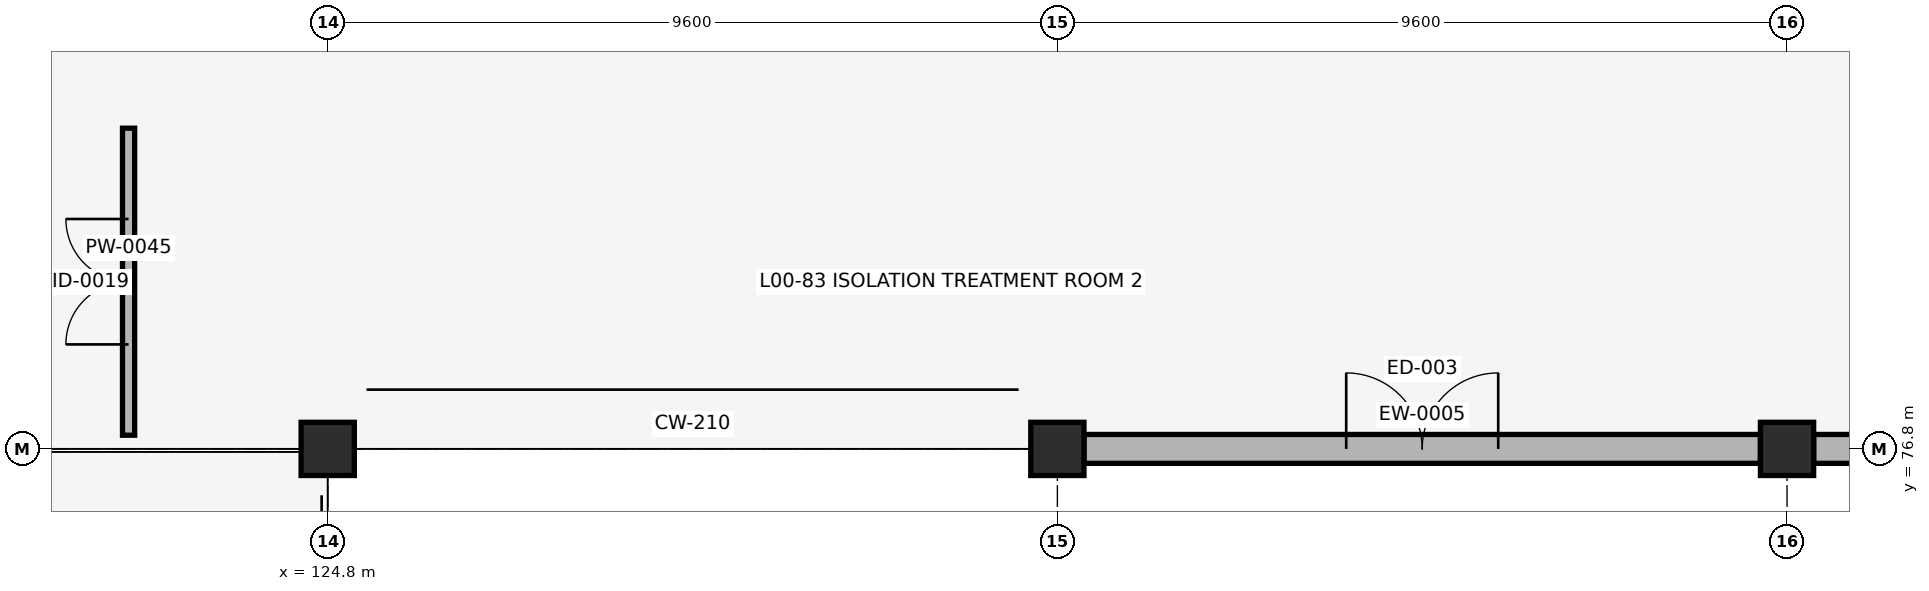
"""IFC4 building model, lengths in metres.
Left out: names, types, materials, properties, quantities, classifications, styles, units other than length and angle.
Written with IfcOpenShell. Run it as: python <this file> out.ifc"""

import sys

from ifc_helpers import new_model, si_unit, direction, frame, frame_2d, origin, origin_2d, place, context, subcontext, project, spatial, rectangle, circle, extrude, element, fill, save


model = new_model("IFC4")
c1 = context("Model", 3, precision=1e-05, world=origin(), true_north=direction((0.0, 1.0)))
c2 = subcontext(c1, "Body", "Model", "MODEL_VIEW")
j1 = project(units=[si_unit("LENGTHUNIT", "METRE"), si_unit("PLANEANGLEUNIT", "RADIAN")], contexts=[c1])
p1 = place(None, origin())
s1 = spatial("IfcSite", under=j1, at=p1, CompositionType="ELEMENT")
p2 = place(p1, origin())
s2 = spatial("IfcBuilding", under=s1, at=p2, CompositionType="ELEMENT")
p3 = place(p2, origin())
s3 = spatial("IfcBuildingStorey", under=s2, at=p3, CompositionType="ELEMENT", Elevation=0.0)
for number, where, z_axis, x_axis in (
    (1, (124.8, 76.8, -0.44), (0.0, 0.0, 1.0), (1.0, 0.0, 0.0)),
    (2, (134.4, 76.8, -0.44), (0.0, 0.0, 1.0), (1.0, 0.0, 0.0)),
    (3, (144.0, 76.8, -0.44), (0.0, 0.0, 1.0), (1.0, 0.0, 0.0)),
):
    element("IfcColumn", number, at=place(p3, frame(where, z_axis=z_axis, x_axis=x_axis)), inside=s3, PredefinedType="COLUMN", context=c2, shape_type="SweptSolid", body=[
        extrude(circle(Radius=0.35, at=origin_2d()), origin(), (0.0, 0.0, 1.0), 4.86),
    ])
p4 = place(p3, frame((134.75, 76.8, 0.0), z_axis=(0.0, 0.0, 1.0), x_axis=(1.0, 0.0, 0.0)))
e4 = element("IfcWall", 4, at=p4, inside=s3, PredefinedType="SOLIDWALL", context=c2, shape_type="SweptSolid", body=[
    extrude(rectangle(XDim=8.9, YDim=0.38, at=frame_2d((4.45, 0.0))), origin(), (0.0, 0.0, 1.0), 3.37),
])
p5 = place(p4, frame((3.45, 0.0, 0.0)))
e5 = element("IfcOpeningElement", 5, at=p5, cuts=e4, PredefinedType="OPENING", context=c2, shape_type="SweptSolid", body=[
    extrude(rectangle(XDim=2.0, YDim=2.3, at=frame_2d((1.0, 1.15))), frame((0.0, 0.2, 0.0), z_axis=(0.0, -1.0, 0.0), x_axis=(1.0, 0.0, 0.0)), (0.0, 0.0, 1.0), 0.4),
])
p6 = place(p3, frame((144.35, 76.8, 0.0), z_axis=(0.0, 0.0, 1.0), x_axis=(1.0, 0.0, 0.0)))
e6 = element("IfcWall", 6, at=p6, inside=s3, PredefinedType="SOLIDWALL", context=c2, shape_type="SweptSolid", body=[
    extrude(rectangle(XDim=8.9, YDim=0.38, at=frame_2d((4.45, 0.0))), origin(), (0.0, 0.0, 1.0), 3.37),
])
p7 = place(p6, frame((2.317, 0.0, 0.72)))
e7 = element("IfcOpeningElement", 7, at=p7, cuts=e6, PredefinedType="OPENING", context=c2, shape_type="SweptSolid", body=[
    extrude(rectangle(XDim=1.3, YDim=2.32, at=frame_2d((0.65, 1.16))), frame((0.0, 0.2, 0.0), z_axis=(0.0, -1.0, 0.0), x_axis=(1.0, 0.0, 0.0)), (0.0, 0.0, 1.0), 0.4),
])
p8 = place(p6, frame((5.283, 0.0, 0.72)))
e8 = element("IfcOpeningElement", 8, at=p8, cuts=e6, PredefinedType="OPENING", context=c2, shape_type="SweptSolid", body=[
    extrude(rectangle(XDim=1.3, YDim=2.32, at=frame_2d((0.65, 1.16))), frame((0.0, 0.2, 0.0), z_axis=(0.0, -1.0, 0.0), x_axis=(1.0, 0.0, 0.0)), (0.0, 0.0, 1.0), 0.4),
])
p9 = place(p3, frame((122.18, 76.98, 0.0), z_axis=(0.0, 0.0, 1.0), x_axis=(0.0, 1.0, 0.0)))
e9 = element("IfcWall", 9, at=p9, inside=s3, PredefinedType="PARTITIONING", context=c2, shape_type="SweptSolid", body=[
    extrude(rectangle(XDim=4.04, YDim=0.16, at=frame_2d((2.02, 0.0))), origin(), (0.0, 0.0, 1.0), 3.37),
])
p10 = place(p9, frame((1.195, 0.0, 0.0)))
e10 = element("IfcOpeningElement", 10, at=p10, cuts=e9, PredefinedType="OPENING", context=c2, shape_type="SweptSolid", body=[
    extrude(rectangle(XDim=1.65, YDim=2.15, at=frame_2d((0.825, 1.075))), frame((0.0, 0.09, 0.0), z_axis=(0.0, -1.0, 0.0), x_axis=(1.0, 0.0, 0.0)), (0.0, 0.0, 1.0), 0.18),
])
p11 = place(p5, origin())
e11 = element("IfcDoor", 11, at=p11, inside=s3, OperationType="DOUBLE_DOOR_SINGLE_SWING", PredefinedType="DOOR", context=c2, shape_type="SweptSolid", body=[
    extrude(rectangle(XDim=2.0, YDim=2.3, at=frame_2d((1.0, 1.15))), frame((0.0, 0.025, 0.0), z_axis=(0.0, -1.0, 0.0), x_axis=(1.0, 0.0, 0.0)), (0.0, 0.0, 1.0), 0.05),
])
fill(e5, e11)
p12 = place(p10, origin())
e12 = element("IfcDoor", 12, at=p12, inside=s3, OperationType="DOUBLE_DOOR_SINGLE_SWING", PredefinedType="DOOR", context=c2, shape_type="SweptSolid", body=[
    extrude(rectangle(XDim=1.65, YDim=2.15, at=frame_2d((0.825, 1.075))), frame((0.0, 0.025, 0.0), z_axis=(0.0, -1.0, 0.0), x_axis=(1.0, 0.0, 0.0)), (0.0, 0.0, 1.0), 0.05),
])
fill(e10, e12)
save(model, sys.argv[1])
